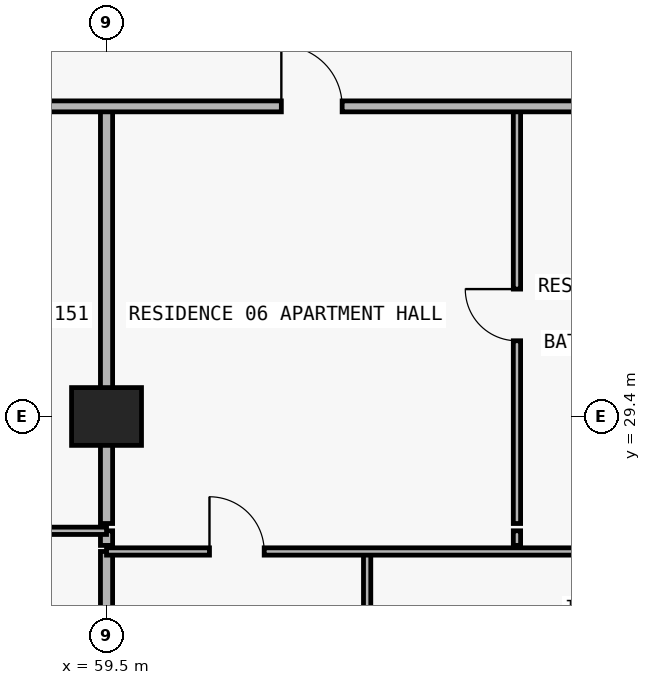
"""IFC4 building model, lengths in metres.
Left out: names, types, materials, properties, quantities, classifications, styles, units other than length and angle.
Written with IfcOpenShell. Run it as: python <this file> out.ifc"""

import sys

from ifc_helpers import new_model, si_unit, direction, frame, frame_2d, origin, origin_2d, place, context, subcontext, project, spatial, rectangle, extrude, element, fill, save


model = new_model("IFC4")
c1 = context("Model", 3, precision=1e-05, world=origin(), true_north=direction((0.0, 1.0)))
c2 = subcontext(c1, "Body", "Model", "MODEL_VIEW")
j1 = project(units=[si_unit("LENGTHUNIT", "METRE"), si_unit("PLANEANGLEUNIT", "RADIAN")], contexts=[c1])
p1 = place(None, origin())
s1 = spatial("IfcSite", under=j1, at=p1, CompositionType="ELEMENT")
p2 = place(p1, origin())
s2 = spatial("IfcBuilding", under=s1, at=p2, CompositionType="ELEMENT")
p3 = place(p2, frame((0.0, 0.0, 30.0)))
s3 = spatial("IfcBuildingStorey", under=s2, at=p3, CompositionType="ELEMENT", Elevation=30.0)
p4 = place(p3, frame((59.5, 29.4, 0.0), z_axis=(0.0, 0.0, 1.0), x_axis=(1.0, 0.0, 0.0)))
e1 = element("IfcColumn", 1, at=p4, inside=s3, PredefinedType="COLUMN", context=c2, shape_type="SweptSolid", body=[
    extrude(rectangle(XDim=1.15, YDim=0.95, at=origin_2d()), origin(), (0.0, 0.0, 1.0), 3.05),
])
p5 = place(p3, frame((59.5, 22.49, 0.0), z_axis=(0.0, 0.0, 1.0), x_axis=(0.0, 1.0, 0.0)))
e2 = element("IfcWall", 2, at=p5, inside=s3, PredefinedType="PARTITIONING", context=c2, shape_type="SweptSolid", body=[
    extrude(rectangle(XDim=4.69, YDim=0.2, at=frame_2d((2.345, 0.0))), origin(), (0.0, 0.0, 1.0), 2.11),
])
p6 = place(p3, frame((59.5, 27.28, 0.0), z_axis=(0.0, 0.0, 1.0), x_axis=(0.0, 1.0, 0.0)))
e3 = element("IfcWall", 3, at=p6, inside=s3, PredefinedType="PARTITIONING", context=c2, shape_type="SweptSolid", body=[
    extrude(rectangle(XDim=0.24, YDim=0.2, at=frame_2d((0.12, 0.0))), origin(), (0.0, 0.0, 1.0), 2.11),
])
p7 = place(p3, frame((59.5, 27.64, 0.0), z_axis=(0.0, 0.0, 1.0), x_axis=(0.0, 1.0, 0.0)))
e4 = element("IfcWall", 4, at=p7, inside=s3, PredefinedType="PARTITIONING", context=c2, shape_type="SweptSolid", body=[
    extrude(rectangle(XDim=6.86, YDim=0.2, at=frame_2d((3.43, 0.0))), origin(), (0.0, 0.0, 1.0), 2.11),
])
p8 = place(p3, frame((63.786, 22.49, 0.0), z_axis=(0.0, 0.0, 1.0), x_axis=(0.0, 1.0, 0.0)))
e5 = element("IfcWall", 5, at=p8, inside=s3, PredefinedType="PARTITIONING", context=c2, shape_type="SweptSolid", body=[
    extrude(rectangle(XDim=4.69, YDim=0.12, at=frame_2d((2.345, 0.0))), origin(), (0.0, 0.0, 1.0), 3.05),
])
p9 = place(p8, frame((1.895, 0.0, 0.0)))
e6 = element("IfcOpeningElement", 6, at=p9, cuts=e5, PredefinedType="OPENING", context=c2, shape_type="SweptSolid", body=[
    extrude(rectangle(XDim=0.9, YDim=2.15, at=frame_2d((0.45, 1.075))), frame((0.0, 0.07, 0.0), z_axis=(0.0, -1.0, 0.0), x_axis=(1.0, 0.0, 0.0)), (0.0, 0.0, 1.0), 0.14),
])
p10 = place(p3, frame((66.25, 27.28, 0.0), z_axis=(0.0, 0.0, 1.0), x_axis=(0.0, 1.0, 0.0)))
e7 = element("IfcWall", 7, at=p10, inside=s3, PredefinedType="PARTITIONING", context=c2, shape_type="SweptSolid", body=[
    extrude(rectangle(XDim=0.24, YDim=0.12, at=frame_2d((0.12, 0.0))), origin(), (0.0, 0.0, 1.0), 3.05),
])
p11 = place(p3, frame((66.25, 27.64, 0.0), z_axis=(0.0, 0.0, 1.0), x_axis=(0.0, 1.0, 0.0)))
e8 = element("IfcWall", 8, at=p11, inside=s3, PredefinedType="PARTITIONING", context=c2, shape_type="SweptSolid", body=[
    extrude(rectangle(XDim=6.86, YDim=0.12, at=frame_2d((3.43, 0.0))), origin(), (0.0, 0.0, 1.0), 3.05),
])
p12 = place(p11, frame((3.005, 0.0, 0.0)))
e9 = element("IfcOpeningElement", 9, at=p12, cuts=e8, PredefinedType="OPENING", context=c2, shape_type="SweptSolid", body=[
    extrude(rectangle(XDim=0.85, YDim=2.1, at=frame_2d((0.425, 1.05))), frame((0.0, 0.07, 0.0), z_axis=(0.0, -1.0, 0.0), x_axis=(1.0, 0.0, 0.0)), (0.0, 0.0, 1.0), 0.14),
])
p13 = place(p3, frame((59.5, 27.18, 0.0), z_axis=(0.0, 0.0, 1.0), x_axis=(1.0, 0.0, 0.0)))
e10 = element("IfcWall", 10, at=p13, inside=s3, PredefinedType="PARTITIONING", context=c2, shape_type="SweptSolid", body=[
    extrude(rectangle(XDim=8.4, YDim=0.12, at=frame_2d((4.2, 0.0))), origin(), (0.0, 0.0, 1.0), 3.05),
])
p14 = place(p13, frame((1.693, 0.0, 0.0)))
e11 = element("IfcOpeningElement", 11, at=p14, cuts=e10, PredefinedType="OPENING", context=c2, shape_type="SweptSolid", body=[
    extrude(rectangle(XDim=0.9, YDim=2.15, at=frame_2d((0.45, 1.075))), frame((0.0, 0.07, 0.0), z_axis=(0.0, -1.0, 0.0), x_axis=(1.0, 0.0, 0.0)), (0.0, 0.0, 1.0), 0.14),
])
p15 = place(p3, frame((55.9, 27.52, 0.0), z_axis=(0.0, 0.0, 1.0), x_axis=(1.0, 0.0, 0.0)))
e12 = element("IfcWall", 12, at=p15, inside=s3, PredefinedType="PARTITIONING", context=c2, shape_type="SweptSolid", body=[
    extrude(rectangle(XDim=3.6, YDim=0.12, at=frame_2d((1.8, 0.0))), origin(), (0.0, 0.0, 1.0), 3.05),
])
p16 = place(p3, frame((55.9, 34.5, 0.0), z_axis=(0.0, 0.0, 1.0), x_axis=(1.0, 0.0, 0.0)))
e13 = element("IfcWall", 13, at=p16, inside=s3, PredefinedType="PARTITIONING", context=c2, shape_type="SweptSolid", body=[
    extrude(rectangle(XDim=16.8, YDim=0.18, at=frame_2d((8.4, 0.0))), origin(), (0.0, 0.0, 1.0), 3.05),
])
p17 = place(p16, frame((6.475, 0.0, 0.0)))
e14 = element("IfcOpeningElement", 14, at=p17, cuts=e13, PredefinedType="OPENING", context=c2, shape_type="SweptSolid", body=[
    extrude(rectangle(XDim=1.0, YDim=2.2, at=frame_2d((0.5, 1.1))), frame((0.0, 0.1, 0.0), z_axis=(0.0, -1.0, 0.0), x_axis=(1.0, 0.0, 0.0)), (0.0, 0.0, 1.0), 0.2),
])
p18 = place(p17, origin())
e15 = element("IfcDoor", 15, at=p18, inside=s3, OperationType="SINGLE_SWING_LEFT", PredefinedType="DOOR", context=c2, shape_type="SweptSolid", body=[
    extrude(rectangle(XDim=1.0, YDim=2.2, at=frame_2d((0.5, 1.1))), frame((0.0, 0.025, 0.0), z_axis=(0.0, -1.0, 0.0), x_axis=(1.0, 0.0, 0.0)), (0.0, 0.0, 1.0), 0.05),
])
fill(e14, e15)
p19 = place(p12, origin())
e16 = element("IfcDoor", 16, at=p19, inside=s3, OperationType="SINGLE_SWING_RIGHT", PredefinedType="DOOR", context=c2, shape_type="SweptSolid", body=[
    extrude(rectangle(XDim=0.85, YDim=2.1, at=frame_2d((0.425, 1.05))), frame((0.0, 0.025, 0.0), z_axis=(0.0, -1.0, 0.0), x_axis=(1.0, 0.0, 0.0)), (0.0, 0.0, 1.0), 0.05),
])
fill(e9, e16)
p20 = place(p14, origin())
e17 = element("IfcDoor", 17, at=p20, inside=s3, OperationType="SINGLE_SWING_LEFT", PredefinedType="DOOR", context=c2, shape_type="SweptSolid", body=[
    extrude(rectangle(XDim=0.9, YDim=2.15, at=frame_2d((0.45, 1.075))), frame((0.0, 0.025, 0.0), z_axis=(0.0, -1.0, 0.0), x_axis=(1.0, 0.0, 0.0)), (0.0, 0.0, 1.0), 0.05),
])
fill(e11, e17)
save(model, sys.argv[1])
